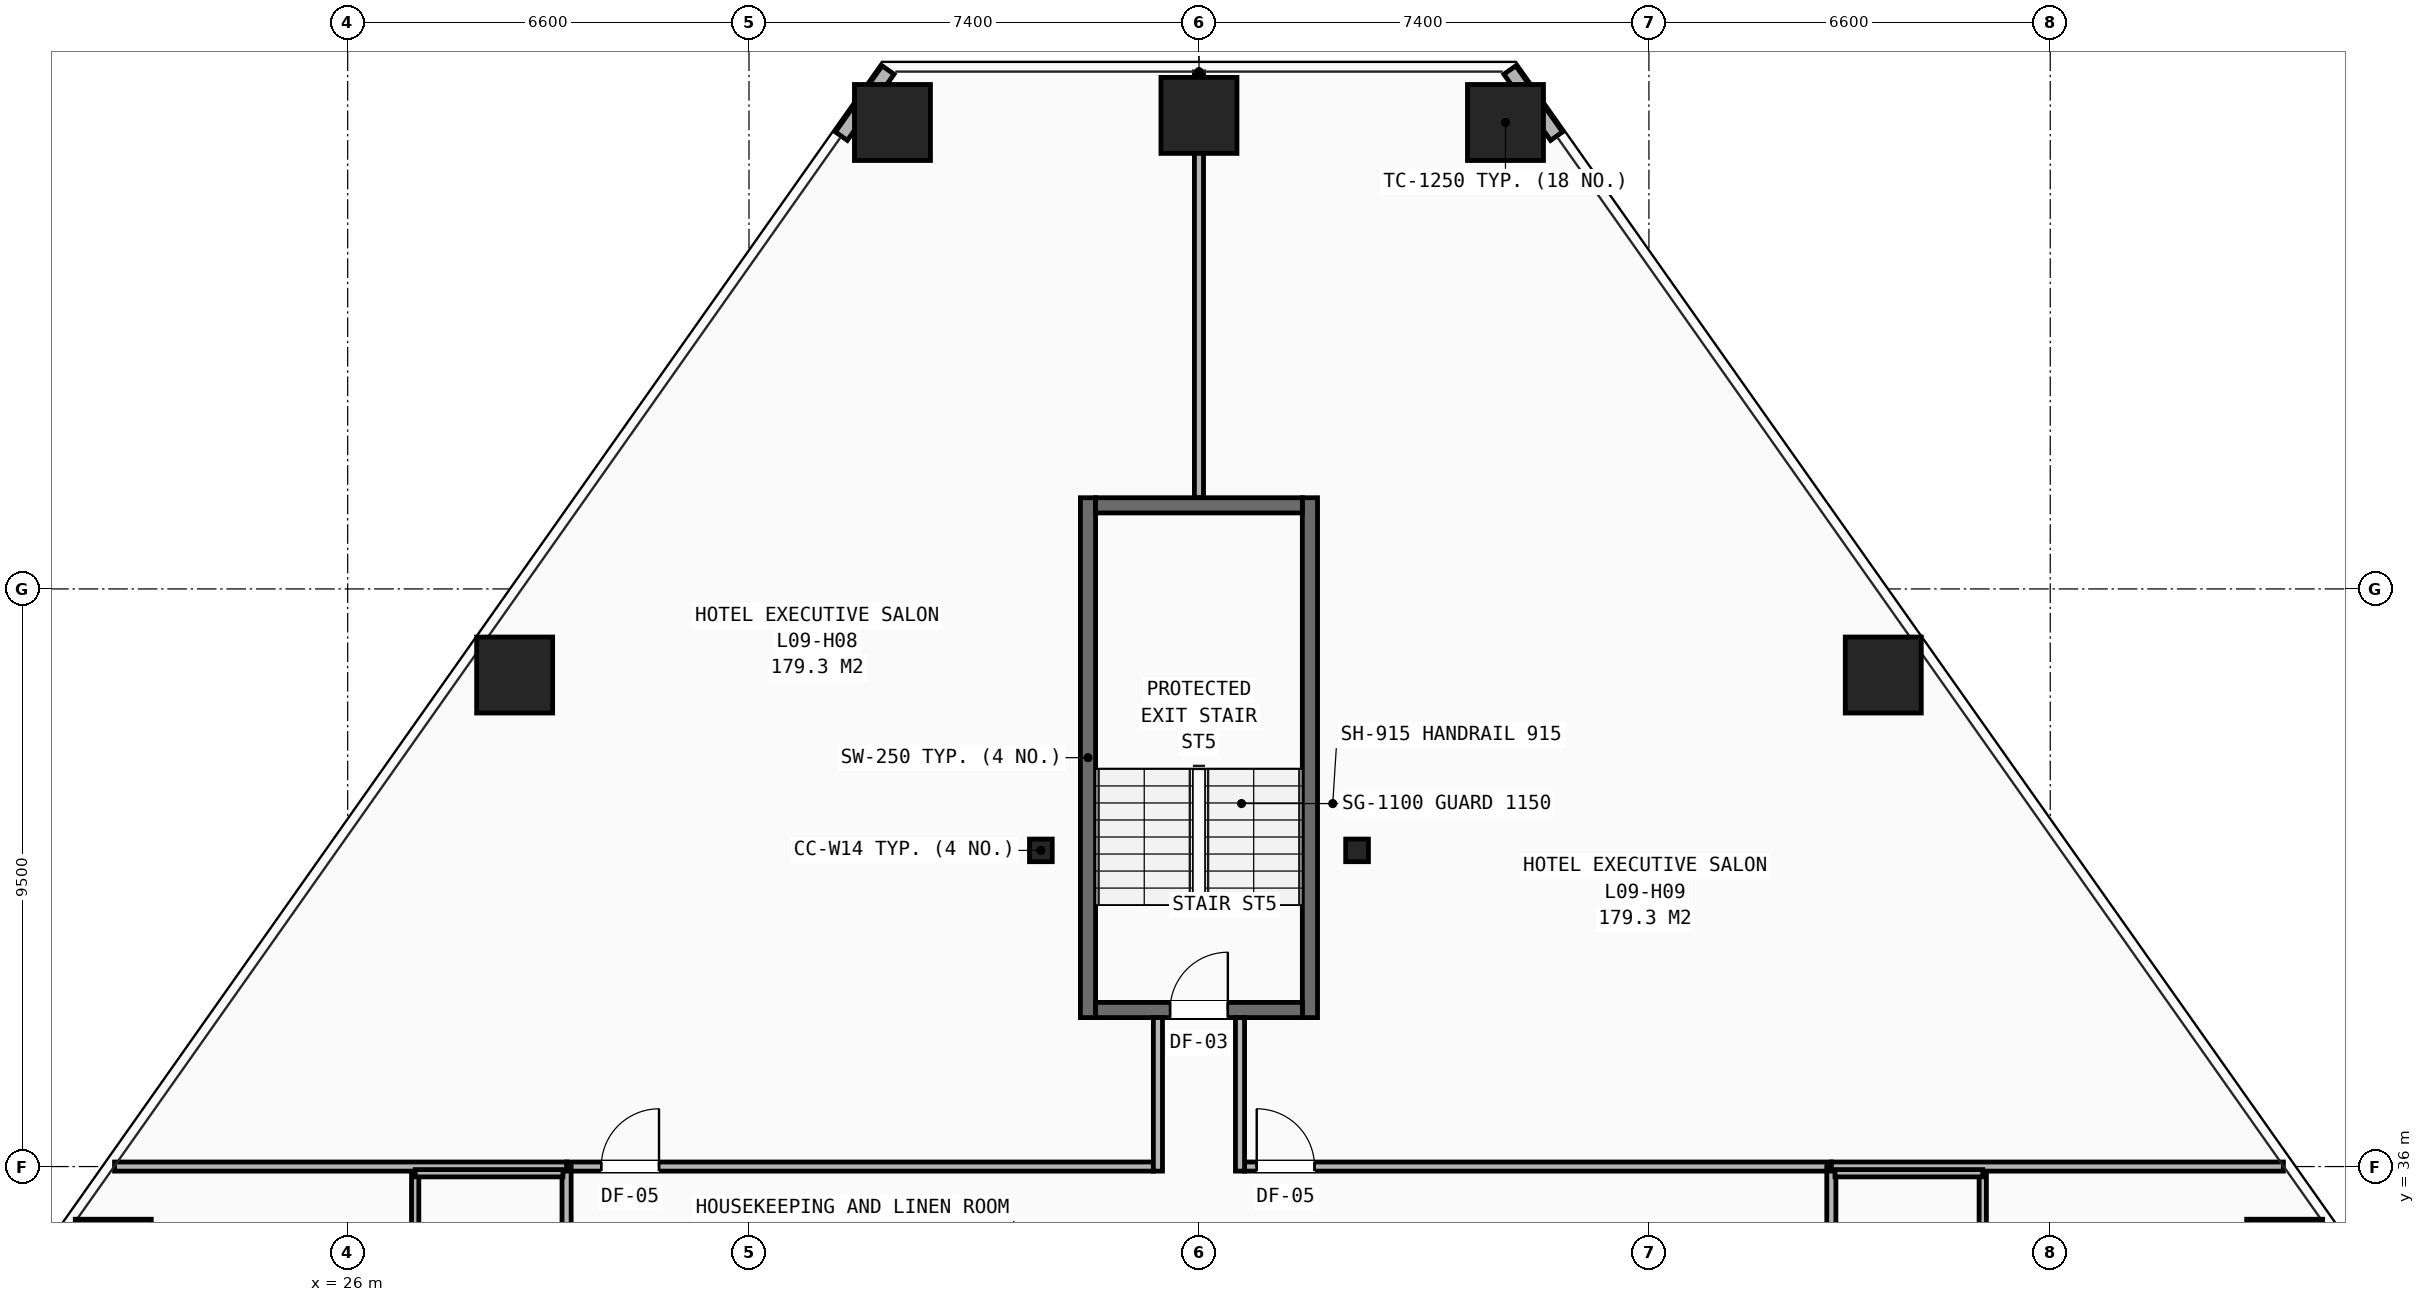
"""IFC4 building model, lengths in metres.
Left out: names, types, materials, properties, quantities, classifications, styles, units other than length and angle.
Written with IfcOpenShell. Run it as: python <this file> out.ifc"""

import sys

from ifc_helpers import new_model, si_unit, direction, frame, frame_2d, origin, origin_2d, place, context, subcontext, project, spatial, rectangle, hollow_rectangle, i_section, extrude, element, fill, save


model = new_model("IFC4")
c1 = context("Model", 3, precision=1e-05, world=origin(), true_north=direction((0.0, 1.0)))
c2 = subcontext(c1, "Body", "Model", "MODEL_VIEW")
j1 = project(units=[si_unit("LENGTHUNIT", "METRE"), si_unit("PLANEANGLEUNIT", "RADIAN")], contexts=[c1])
p1 = place(None, origin())
s1 = spatial("IfcSite", under=j1, at=p1, CompositionType="ELEMENT")
p2 = place(p1, origin())
s2 = spatial("IfcBuilding", under=s1, at=p2, CompositionType="ELEMENT")
p3 = place(p2, frame((0.0, 0.0, 36.8)))
s3 = spatial("IfcBuildingStorey", under=s2, at=p3, CompositionType="ELEMENT", Elevation=36.8)
for number, where, z_axis, x_axis in (
    (1, (37.4, 41.2, 0.0), (0.0, 0.0, 1.0), (1.0, 0.0, 0.0)),
    (2, (42.6, 41.2, 0.0), (0.0, 0.0, 1.0), (1.0, 0.0, 0.0)),
):
    element("IfcColumn", number, at=place(p3, frame(where, z_axis=z_axis, x_axis=x_axis)), inside=s3, PredefinedType="COLUMN", context=c2, shape_type="SweptSolid", body=[
        extrude(i_section(OverallWidth=0.374, OverallDepth=0.372, WebThickness=0.016, FlangeThickness=0.026, at=origin_2d()), origin(), (0.0, 0.0, 1.0), 3.2),
    ])
for number, where, z_axis, x_axis in (
    (3, (45.041, 53.172, 0.0), (0.0, 0.0, 1.0), (1.0, 0.0, 0.0)),
    (4, (40.0, 53.289, 0.0), (0.0, 0.0, 1.0), (1.0, 0.0, 0.0)),
    (5, (34.959, 53.172, 0.0), (0.0, 0.0, 1.0), (1.0, 0.0, 0.0)),
    (6, (28.746, 44.084, 0.0), (0.0, 0.0, 1.0), (1.0, 0.0, 0.0)),
    (7, (22.145, 34.509, 0.0), (0.0, 0.0, 1.0), (1.0, 0.0, 0.0)),
    (8, (57.855, 34.509, 0.0), (0.0, 0.0, 1.0), (1.0, 0.0, 0.0)),
    (9, (51.254, 44.084, 0.0), (0.0, 0.0, 1.0), (1.0, 0.0, 0.0)),
):
    element("IfcColumn", number, at=place(p3, frame(where, z_axis=z_axis, x_axis=x_axis)), inside=s3, PredefinedType="COLUMN", context=c2, shape_type="SweptSolid", body=[
        extrude(hollow_rectangle(XDim=1.25, YDim=1.25, WallThickness=0.08, at=origin_2d()), origin(), (0.0, 0.0, 1.0), 3.2),
    ])
for number, where, z_axis, x_axis in (
    (10, (34.887, 54.035, 0.0), (0.0, 0.0, 1.0), (-0.577, -0.817, 0.0)),
    (11, (45.881, 52.947, 0.0), (0.0, 0.0, 1.0), (-0.577, 0.817, 0.0)),
):
    element("IfcWall", number, at=place(p3, frame(where, z_axis=z_axis, x_axis=x_axis)), inside=s3, PredefinedType="SHEAR", context=c2, shape_type="SweptSolid", body=[
        extrude(rectangle(XDim=1.332, YDim=0.24, at=frame_2d((0.666, 0.0))), origin(), (0.0, 0.0, 1.0), 2.263),
    ])
p4 = place(p3, frame((29.6, 36.0, 0.0), z_axis=(0.0, 0.0, 1.0), x_axis=(1.0, 0.0, 0.0)))
e12 = element("IfcWall", 12, at=p4, inside=s3, PredefinedType="PARTITIONING", context=c2, shape_type="SweptSolid", body=[
    extrude(rectangle(XDim=9.65, YDim=0.15, at=frame_2d((4.825, 0.0))), origin(), (0.0, 0.0, 1.0), 2.98),
])
p5 = place(p4, frame((0.57, 0.0, 0.0)))
e13 = element("IfcOpeningElement", 13, at=p5, cuts=e12, PredefinedType="OPENING", context=c2, shape_type="SweptSolid", body=[
    extrude(rectangle(XDim=0.95, YDim=2.1, at=frame_2d((0.475, 1.05))), frame((0.0, 0.085, 0.0), z_axis=(0.0, -1.0, 0.0), x_axis=(1.0, 0.0, 0.0)), (0.0, 0.0, 1.0), 0.17),
])
p6 = place(p3, frame((40.75, 36.0, 0.0), z_axis=(0.0, 0.0, 1.0), x_axis=(1.0, 0.0, 0.0)))
e14 = element("IfcWall", 14, at=p6, inside=s3, PredefinedType="PARTITIONING", context=c2, shape_type="SweptSolid", body=[
    extrude(rectangle(XDim=9.65, YDim=0.15, at=frame_2d((4.825, 0.0))), origin(), (0.0, 0.0, 1.0), 2.513),
])
p7 = place(p6, frame((0.2, 0.0, 0.0)))
e15 = element("IfcOpeningElement", 15, at=p7, cuts=e14, PredefinedType="OPENING", context=c2, shape_type="SweptSolid", body=[
    extrude(rectangle(XDim=0.95, YDim=2.1, at=frame_2d((0.475, 1.05))), frame((0.0, 0.085, 0.0), z_axis=(0.0, -1.0, 0.0), x_axis=(1.0, 0.0, 0.0)), (0.0, 0.0, 1.0), 0.17),
])
p8 = place(p3, frame((29.6, 14.1, 0.0), z_axis=(0.0, 0.0, 1.0), x_axis=(0.0, 1.0, 0.0)))
e16 = element("IfcWall", 16, at=p8, inside=s3, PredefinedType="PARTITIONING", context=c2, shape_type="SweptSolid", body=[
    extrude(rectangle(XDim=21.9, YDim=0.15, at=frame_2d((10.95, 0.0))), origin(), (0.0, 0.0, 1.0), 2.431),
])
p9 = place(p8, frame((0.42, 0.0, 0.0)))
e17 = element("IfcOpeningElement", 17, at=p9, cuts=e16, PredefinedType="OPENING", context=c2, shape_type="SweptSolid", body=[
    extrude(rectangle(XDim=0.95, YDim=2.1, at=frame_2d((0.475, 1.05))), frame((0.0, 0.085, 0.0), z_axis=(0.0, -1.0, 0.0), x_axis=(1.0, 0.0, 0.0)), (0.0, 0.0, 1.0), 0.17),
])
p10 = place(p8, frame((11.32, 0.0, 0.0)))
e18 = element("IfcOpeningElement", 18, at=p10, cuts=e16, PredefinedType="OPENING", context=c2, shape_type="SweptSolid", body=[
    extrude(rectangle(XDim=0.95, YDim=2.1, at=frame_2d((0.475, 1.05))), frame((0.0, 0.085, 0.0), z_axis=(0.0, -1.0, 0.0), x_axis=(1.0, 0.0, 0.0)), (0.0, 0.0, 1.0), 0.17),
])
p11 = place(p3, frame((50.4, 14.1, 0.0), z_axis=(0.0, 0.0, 1.0), x_axis=(0.0, 1.0, 0.0)))
e19 = element("IfcWall", 19, at=p11, inside=s3, PredefinedType="PARTITIONING", context=c2, shape_type="SweptSolid", body=[
    extrude(rectangle(XDim=21.9, YDim=0.15, at=frame_2d((10.95, 0.0))), origin(), (0.0, 0.0, 1.0), 2.431),
])
p12 = place(p11, frame((0.42, 0.0, 0.0)))
e20 = element("IfcOpeningElement", 20, at=p12, cuts=e19, PredefinedType="OPENING", context=c2, shape_type="SweptSolid", body=[
    extrude(rectangle(XDim=0.95, YDim=2.1, at=frame_2d((0.475, 1.05))), frame((0.0, 0.085, 0.0), z_axis=(0.0, -1.0, 0.0), x_axis=(1.0, 0.0, 0.0)), (0.0, 0.0, 1.0), 0.17),
])
p13 = place(p11, frame((7.32, 0.0, 0.0)))
e21 = element("IfcOpeningElement", 21, at=p13, cuts=e19, PredefinedType="OPENING", context=c2, shape_type="SweptSolid", body=[
    extrude(rectangle(XDim=0.95, YDim=2.1, at=frame_2d((0.475, 1.05))), frame((0.0, 0.085, 0.0), z_axis=(0.0, -1.0, 0.0), x_axis=(1.0, 0.0, 0.0)), (0.0, 0.0, 1.0), 0.17),
])
p14 = place(p11, frame((15.82, 0.0, 0.0)))
e22 = element("IfcOpeningElement", 22, at=p14, cuts=e19, PredefinedType="OPENING", context=c2, shape_type="SweptSolid", body=[
    extrude(rectangle(XDim=0.95, YDim=2.1, at=frame_2d((0.475, 1.05))), frame((0.0, 0.085, 0.0), z_axis=(0.0, -1.0, 0.0), x_axis=(1.0, 0.0, 0.0)), (0.0, 0.0, 1.0), 0.17),
])
p15 = place(p3, frame((22.166, 36.0, 0.0), z_axis=(0.0, 0.0, 1.0), x_axis=(1.0, 0.0, 0.0)))
e23 = element("IfcWall", 23, at=p15, inside=s3, PredefinedType="PARTITIONING", context=c2, shape_type="SweptSolid", body=[
    extrude(rectangle(XDim=7.434, YDim=0.15, at=frame_2d((3.717, 0.0))), origin(), (0.0, 0.0, 1.0), 2.268),
])
p16 = place(p3, frame((27.11, 33.61, 0.0), z_axis=(0.0, 0.0, 1.0), x_axis=(0.0, 1.0, 0.0)))
e24 = element("IfcWall", 24, at=p16, inside=s3, PredefinedType="PARTITIONING", context=c2, shape_type="SweptSolid", body=[
    extrude(rectangle(XDim=2.28, YDim=0.12, at=frame_2d((1.14, 0.0))), origin(), (0.0, 0.0, 1.0), 2.513),
])
p17 = place(p3, frame((27.11, 35.89, 0.0), z_axis=(0.0, 0.0, 1.0), x_axis=(1.0, 0.0, 0.0)))
e25 = element("IfcWall", 25, at=p17, inside=s3, PredefinedType="PARTITIONING", context=c2, shape_type="SweptSolid", body=[
    extrude(rectangle(XDim=2.43, YDim=0.12, at=frame_2d((1.215, 0.0))), origin(), (0.0, 0.0, 1.0), 2.513),
])
p18 = place(p3, frame((50.4, 36.0, 0.0), z_axis=(0.0, 0.0, 1.0), x_axis=(1.0, 0.0, 0.0)))
e26 = element("IfcWall", 26, at=p18, inside=s3, PredefinedType="PARTITIONING", context=c2, shape_type="SweptSolid", body=[
    extrude(rectangle(XDim=7.434, YDim=0.15, at=frame_2d((3.717, 0.0))), origin(), (0.0, 0.0, 1.0), 2.268),
])
p19 = place(p3, frame((52.89, 33.61, 0.0), z_axis=(0.0, 0.0, 1.0), x_axis=(0.0, 1.0, 0.0)))
e27 = element("IfcWall", 27, at=p19, inside=s3, PredefinedType="PARTITIONING", context=c2, shape_type="SweptSolid", body=[
    extrude(rectangle(XDim=2.28, YDim=0.12, at=frame_2d((1.14, 0.0))), origin(), (0.0, 0.0, 1.0), 2.98),
])
p20 = place(p3, frame((50.46, 35.89, 0.0), z_axis=(0.0, 0.0, 1.0), x_axis=(1.0, 0.0, 0.0)))
e28 = element("IfcWall", 28, at=p20, inside=s3, PredefinedType="PARTITIONING", context=c2, shape_type="SweptSolid", body=[
    extrude(rectangle(XDim=2.43, YDim=0.12, at=frame_2d((1.215, 0.0))), origin(), (0.0, 0.0, 1.0), 2.513),
])
p21 = place(p3, frame((40.0, 47.0, 0.0), z_axis=(0.0, 0.0, 1.0), x_axis=(0.0, 1.0, 0.0)))
e29 = element("IfcWall", 29, at=p21, inside=s3, PredefinedType="PARTITIONING", context=c2, shape_type="SweptSolid", body=[
    extrude(rectangle(XDim=7.004, YDim=0.15, at=frame_2d((3.502, 0.0))), origin(), (0.0, 0.0, 1.0), 2.268),
])
for number, where, z_axis, x_axis in (
    (30, (38.175, 38.45, 0.0), (0.0, 0.0, 1.0), (0.0, 1.0, 0.0)),
    (31, (41.825, 38.45, 0.0), (0.0, 0.0, 1.0), (0.0, 1.0, 0.0)),
):
    element("IfcWall", number, at=place(p3, frame(where, z_axis=z_axis, x_axis=x_axis)), inside=s3, PredefinedType="SHEAR", context=c2, shape_type="SweptSolid", body=[
        extrude(rectangle(XDim=8.55, YDim=0.25, at=frame_2d((4.275, 0.0))), origin(), (0.0, 0.0, 1.0), 2.98),
    ])
p22 = place(p3, frame((38.3, 38.575, 0.0), z_axis=(0.0, 0.0, 1.0), x_axis=(1.0, 0.0, 0.0)))
e32 = element("IfcWall", 32, at=p22, inside=s3, PredefinedType="SHEAR", context=c2, shape_type="SweptSolid", body=[
    extrude(rectangle(XDim=3.4, YDim=0.25, at=frame_2d((1.7, 0.0))), origin(), (0.0, 0.0, 1.0), 2.98),
])
p23 = place(p22, frame((1.225, 0.0, 0.0)))
e33 = element("IfcOpeningElement", 33, at=p23, cuts=e32, PredefinedType="OPENING", context=c2, shape_type="SweptSolid", body=[
    extrude(rectangle(XDim=0.95, YDim=2.1, at=frame_2d((0.475, 1.05))), frame((0.0, 0.135, 0.0), z_axis=(0.0, -1.0, 0.0), x_axis=(1.0, 0.0, 0.0)), (0.0, 0.0, 1.0), 0.27),
])
p24 = place(p3, frame((38.3, 46.875, 0.0), z_axis=(0.0, 0.0, 1.0), x_axis=(1.0, 0.0, 0.0)))
e34 = element("IfcWall", 34, at=p24, inside=s3, PredefinedType="SHEAR", context=c2, shape_type="SweptSolid", body=[
    extrude(rectangle(XDim=3.4, YDim=0.25, at=frame_2d((1.7, 0.0))), origin(), (0.0, 0.0, 1.0), 2.98),
])
for number, where, z_axis, x_axis in (
    (35, (39.325, 35.925, 0.0), (0.0, 0.0, 1.0), (0.0, 1.0, 0.0)),
    (36, (40.675, 35.925, 0.0), (0.0, 0.0, 1.0), (0.0, 1.0, 0.0)),
):
    element("IfcWall", number, at=place(p3, frame(where, z_axis=z_axis, x_axis=x_axis)), inside=s3, PredefinedType="PARTITIONING", context=c2, shape_type="SweptSolid", body=[
        extrude(rectangle(XDim=2.525, YDim=0.15, at=frame_2d((1.262, 0.0))), origin(), (0.0, 0.0, 1.0), 2.98),
    ])
p25 = place(p5, origin())
e37 = element("IfcDoor", 37, at=p25, inside=s3, OperationType="SINGLE_SWING_RIGHT", PredefinedType="DOOR", context=c2, shape_type="SweptSolid", body=[
    extrude(rectangle(XDim=0.95, YDim=2.1, at=frame_2d((0.475, 1.05))), frame((0.0, 0.025, 0.0), z_axis=(0.0, -1.0, 0.0), x_axis=(1.0, 0.0, 0.0)), (0.0, 0.0, 1.0), 0.05),
])
fill(e13, e37)
p26 = place(p7, origin())
e38 = element("IfcDoor", 38, at=p26, inside=s3, OperationType="SINGLE_SWING_LEFT", PredefinedType="DOOR", context=c2, shape_type="SweptSolid", body=[
    extrude(rectangle(XDim=0.95, YDim=2.1, at=frame_2d((0.475, 1.05))), frame((0.0, 0.025, 0.0), z_axis=(0.0, -1.0, 0.0), x_axis=(1.0, 0.0, 0.0)), (0.0, 0.0, 1.0), 0.05),
])
fill(e15, e38)
p27 = place(p23, origin())
e39 = element("IfcDoor", 39, at=p27, inside=s3, OperationType="SINGLE_SWING_RIGHT", PredefinedType="DOOR", context=c2, shape_type="SweptSolid", body=[
    extrude(rectangle(XDim=0.95, YDim=2.1, at=frame_2d((0.475, 1.05))), frame((0.0, 0.025, 0.0), z_axis=(0.0, -1.0, 0.0), x_axis=(1.0, 0.0, 0.0)), (0.0, 0.0, 1.0), 0.05),
])
fill(e33, e39)
save(model, sys.argv[1])
